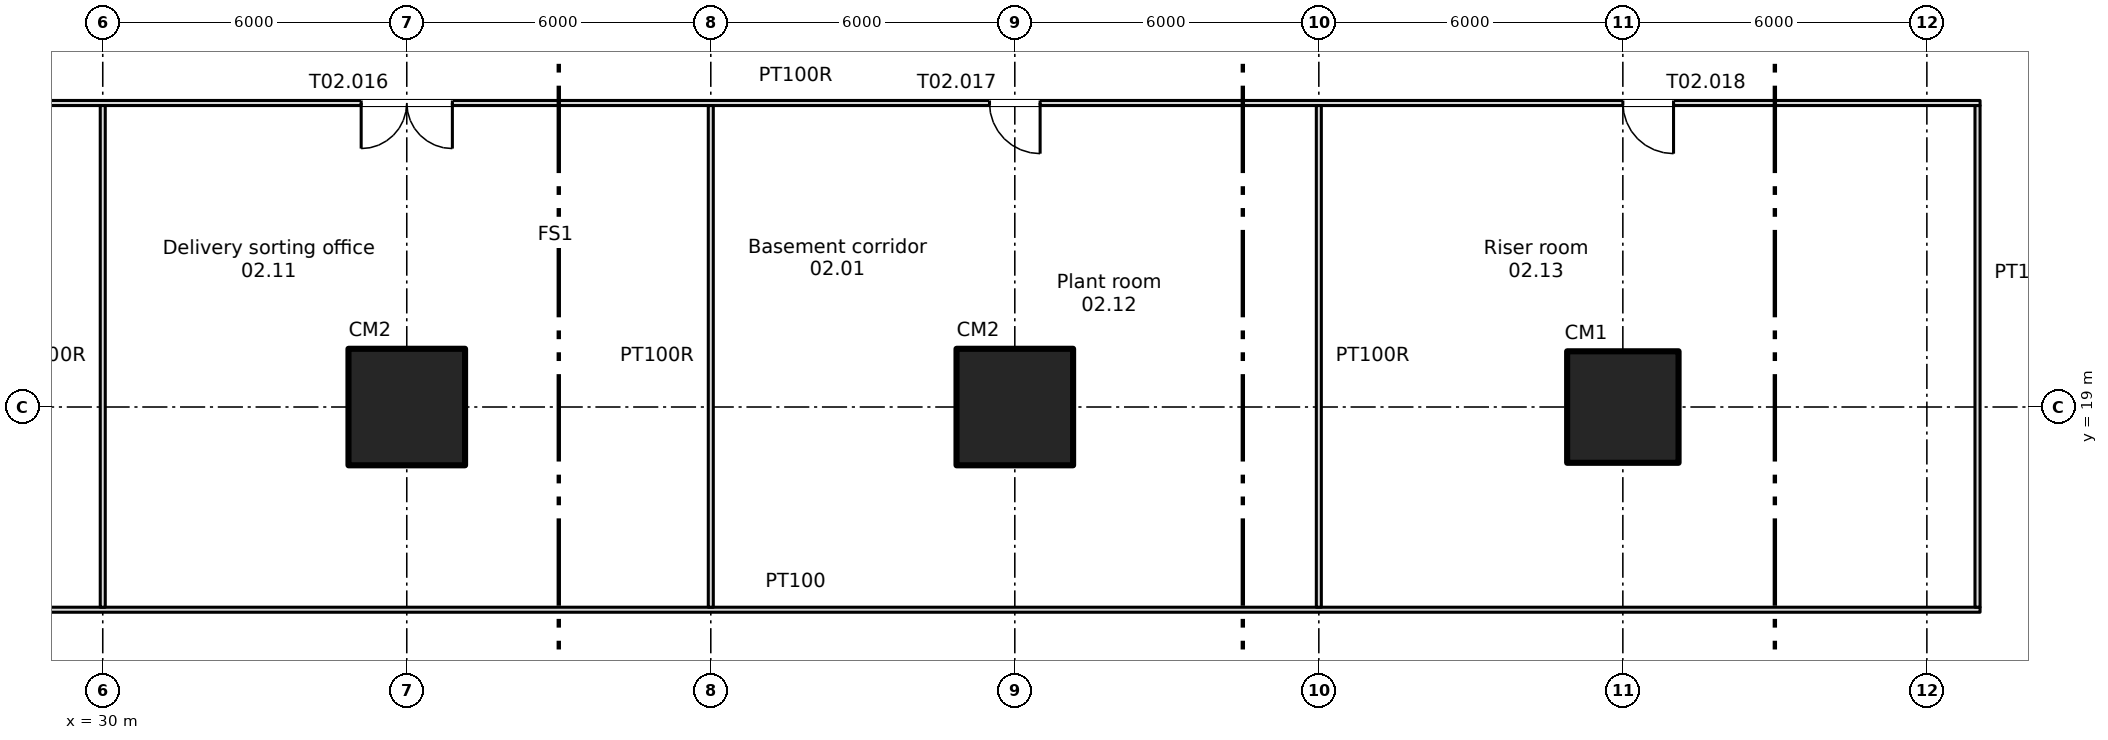
"""IFC4 building model, lengths in metres.
Left out: names, types, materials, properties, quantities, classifications, styles, units other than length and angle.
Written with IfcOpenShell. Run it as: python <this file> out.ifc"""

import sys

from ifc_helpers import new_model, si_unit, direction, frame, frame_2d, origin, origin_2d, place, context, subcontext, project, spatial, rectangle, extrude, element, fill, save


model = new_model("IFC4")
c1 = context("Model", 3, precision=1e-05, world=origin(), true_north=direction((0.0, 1.0)))
c2 = subcontext(c1, "Body", "Model", "MODEL_VIEW")
j1 = project(units=[si_unit("LENGTHUNIT", "METRE"), si_unit("PLANEANGLEUNIT", "RADIAN")], contexts=[c1])
p1 = place(None, origin())
s1 = spatial("IfcSite", under=j1, at=p1, CompositionType="ELEMENT")
p2 = place(p1, origin())
s2 = spatial("IfcBuilding", under=s1, at=p2, CompositionType="ELEMENT")
p3 = place(p2, frame((0.0, 0.0, -6.0)))
s3 = spatial("IfcBuildingStorey", under=s2, at=p3, CompositionType="ELEMENT", Elevation=-6.0)
for number, where, z_axis, x_axis in (
    (1, (36.0, 19.0, 0.0), (0.0, 0.0, 1.0), (1.0, 0.0, 0.0)),
    (2, (48.0, 19.0, 0.0), (0.0, 0.0, 1.0), (1.0, 0.0, 0.0)),
):
    element("IfcColumn", number, at=place(p3, frame(where, z_axis=z_axis, x_axis=x_axis)), inside=s3, PredefinedType="COLUMN", context=c2, shape_type="SweptSolid", body=[
        extrude(rectangle(XDim=2.3, YDim=2.3, at=origin_2d()), origin(), (0.0, 0.0, 1.0), 5.55),
    ])
p4 = place(p3, frame((60.0, 19.0, 0.0), z_axis=(0.0, 0.0, 1.0), x_axis=(1.0, 0.0, 0.0)))
e3 = element("IfcColumn", 3, at=p4, inside=s3, PredefinedType="COLUMN", context=c2, shape_type="SweptSolid", body=[
    extrude(rectangle(XDim=2.2, YDim=2.2, at=origin_2d()), origin(), (0.0, 0.0, 1.0), 5.55),
])
p5 = place(p3, frame((10.95, 15.0, 0.0), z_axis=(0.0, 0.0, 1.0), x_axis=(1.0, 0.0, 0.0)))
e4 = element("IfcWall", 4, at=p5, inside=s3, PredefinedType="PARTITIONING", context=c2, shape_type="SweptSolid", body=[
    extrude(rectangle(XDim=56.1, YDim=0.1, at=frame_2d((28.05, 0.0))), origin(), (0.0, 0.0, 1.0), 5.55),
])
p6 = place(p3, frame((10.95, 25.0, 0.0), z_axis=(0.0, 0.0, 1.0), x_axis=(1.0, 0.0, 0.0)))
e5 = element("IfcWall", 5, at=p6, inside=s3, PredefinedType="PARTITIONING", context=c2, shape_type="SweptSolid", body=[
    extrude(rectangle(XDim=56.1, YDim=0.1, at=frame_2d((28.05, 0.0))), origin(), (0.0, 0.0, 1.0), 5.55),
])
p7 = place(p6, frame((12.55, 0.0, 0.0)))
e6 = element("IfcOpeningElement", 6, at=p7, cuts=e5, PredefinedType="OPENING", context=c2, shape_type="SweptSolid", body=[
    extrude(rectangle(XDim=1.0, YDim=2.1, at=frame_2d((0.5, 1.05))), frame((0.0, 0.06, 0.0), z_axis=(0.0, -1.0, 0.0), x_axis=(1.0, 0.0, 0.0)), (0.0, 0.0, 1.0), 0.12),
])
p8 = place(p6, frame((24.15, 0.0, 0.0)))
e7 = element("IfcOpeningElement", 7, at=p8, cuts=e5, PredefinedType="OPENING", context=c2, shape_type="SweptSolid", body=[
    extrude(rectangle(XDim=1.8, YDim=2.1, at=frame_2d((0.9, 1.05))), frame((0.0, 0.06, 0.0), z_axis=(0.0, -1.0, 0.0), x_axis=(1.0, 0.0, 0.0)), (0.0, 0.0, 1.0), 0.12),
])
p9 = place(p6, frame((36.55, 0.0, 0.0)))
e8 = element("IfcOpeningElement", 8, at=p9, cuts=e5, PredefinedType="OPENING", context=c2, shape_type="SweptSolid", body=[
    extrude(rectangle(XDim=1.0, YDim=2.1, at=frame_2d((0.5, 1.05))), frame((0.0, 0.06, 0.0), z_axis=(0.0, -1.0, 0.0), x_axis=(1.0, 0.0, 0.0)), (0.0, 0.0, 1.0), 0.12),
])
p10 = place(p6, frame((49.05, 0.0, 0.0)))
e9 = element("IfcOpeningElement", 9, at=p10, cuts=e5, PredefinedType="OPENING", context=c2, shape_type="SweptSolid", body=[
    extrude(rectangle(XDim=1.0, YDim=2.1, at=frame_2d((0.5, 1.05))), frame((0.0, 0.06, 0.0), z_axis=(0.0, -1.0, 0.0), x_axis=(1.0, 0.0, 0.0)), (0.0, 0.0, 1.0), 0.12),
])
for number, where, z_axis, x_axis in (
    (10, (30.0, 15.05, 0.0), (0.0, 0.0, 1.0), (0.0, 1.0, 0.0)),
    (11, (42.0, 15.05, 0.0), (0.0, 0.0, 1.0), (0.0, 1.0, 0.0)),
    (12, (54.0, 15.05, 0.0), (0.0, 0.0, 1.0), (0.0, 1.0, 0.0)),
    (13, (67.0, 15.05, 0.0), (0.0, 0.0, 1.0), (0.0, 1.0, 0.0)),
):
    element("IfcWall", number, at=place(p3, frame(where, z_axis=z_axis, x_axis=x_axis)), inside=s3, PredefinedType="PARTITIONING", context=c2, shape_type="SweptSolid", body=[
        extrude(rectangle(XDim=9.9, YDim=0.1, at=frame_2d((4.95, 0.0))), origin(), (0.0, 0.0, 1.0), 5.55),
    ])
p11 = place(p8, origin())
e14 = element("IfcDoor", 14, at=p11, inside=s3, OperationType="DOUBLE_DOOR_SINGLE_SWING", PredefinedType="DOOR", context=c2, shape_type="SweptSolid", body=[
    extrude(rectangle(XDim=1.8, YDim=2.1, at=frame_2d((0.9, 1.05))), frame((0.0, 0.025, 0.0), z_axis=(0.0, -1.0, 0.0), x_axis=(1.0, 0.0, 0.0)), (0.0, 0.0, 1.0), 0.05),
])
fill(e7, e14)
p12 = place(p9, origin())
e15 = element("IfcDoor", 15, at=p12, inside=s3, OperationType="SINGLE_SWING_RIGHT", PredefinedType="DOOR", context=c2, shape_type="SweptSolid", body=[
    extrude(rectangle(XDim=1.0, YDim=2.1, at=frame_2d((0.5, 1.05))), frame((0.0, 0.025, 0.0), z_axis=(0.0, -1.0, 0.0), x_axis=(1.0, 0.0, 0.0)), (0.0, 0.0, 1.0), 0.05),
])
fill(e8, e15)
p13 = place(p10, origin())
e16 = element("IfcDoor", 16, at=p13, inside=s3, OperationType="SINGLE_SWING_RIGHT", PredefinedType="DOOR", context=c2, shape_type="SweptSolid", body=[
    extrude(rectangle(XDim=1.0, YDim=2.1, at=frame_2d((0.5, 1.05))), frame((0.0, 0.025, 0.0), z_axis=(0.0, -1.0, 0.0), x_axis=(1.0, 0.0, 0.0)), (0.0, 0.0, 1.0), 0.05),
])
fill(e9, e16)
save(model, sys.argv[1])
